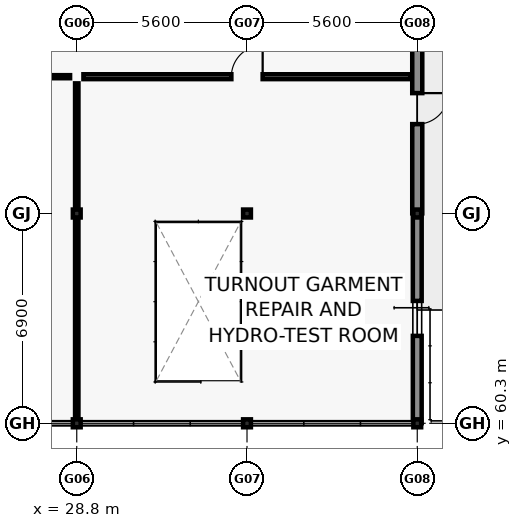
"""IFC4 building model, lengths in metres.
Left out: names, types, materials, properties, quantities, classifications, styles, units other than length and angle.
Written with IfcOpenShell. Run it as: python <this file> out.ifc"""

import sys

from ifc_helpers import new_model, si_unit, direction, frame, frame_2d, origin, origin_2d, place, context, subcontext, project, spatial, rectangle, i_section, extrude, element, fill, save


model = new_model("IFC4")
c1 = context("Model", 3, precision=1e-05, world=origin(), true_north=direction((0.0, 1.0)))
c2 = subcontext(c1, "Body", "Model", "MODEL_VIEW")
j1 = project(units=[si_unit("LENGTHUNIT", "METRE"), si_unit("PLANEANGLEUNIT", "RADIAN")], contexts=[c1])
p1 = place(None, origin())
s1 = spatial("IfcSite", under=j1, at=p1, CompositionType="ELEMENT")
p2 = place(p1, origin())
s2 = spatial("IfcBuilding", under=s1, at=p2, CompositionType="ELEMENT")
p3 = place(p2, frame((0.0, 0.0, 5.4)))
s3 = spatial("IfcBuildingStorey", under=s2, at=p3, CompositionType="ELEMENT", Elevation=5.4)
for number, where, z_axis, x_axis in (
    (1, (28.8, 60.3, 0.0), (0.0, 0.0, 1.0), (1.0, 0.0, 0.0)),
    (2, (28.8, 67.2, 0.0), (0.0, 0.0, 1.0), (1.0, 0.0, 0.0)),
    (3, (34.4, 60.3, 0.0), (0.0, 0.0, 1.0), (1.0, 0.0, 0.0)),
    (4, (34.4, 67.2, 0.0), (0.0, 0.0, 1.0), (1.0, 0.0, 0.0)),
    (5, (40.0, 60.3, 0.0), (0.0, 0.0, 1.0), (1.0, 0.0, 0.0)),
    (6, (40.0, 67.2, 0.0), (0.0, 0.0, 1.0), (1.0, 0.0, 0.0)),
):
    element("IfcColumn", number, at=place(p3, frame(where, z_axis=z_axis, x_axis=x_axis)), inside=s3, PredefinedType="COLUMN", context=c2, shape_type="SweptSolid", body=[
        extrude(i_section(OverallWidth=0.256, OverallDepth=0.26, WebThickness=0.01, FlangeThickness=0.017, FilletRadius=0.013, at=origin_2d()), origin(), (0.0, 0.0, 1.0), 4.2),
    ])
p4 = place(p3, frame((40.0, 67.195, 0.0), z_axis=(0.0, 0.0, 1.0), x_axis=(0.0, -1.0, 0.0)))
e7 = element("IfcWall", 7, at=p4, inside=s3, PredefinedType="SOLIDWALL", context=c2, shape_type="SweptSolid", body=[
    extrude(rectangle(XDim=6.89, YDim=0.29, at=frame_2d((3.445, 0.0))), origin(), (0.0, 0.0, 1.0), 3.32),
])
p5 = place(p4, frame((2.87, 0.0, 0.8)))
e8 = element("IfcOpeningElement", 8, at=p5, cuts=e7, PredefinedType="OPENING", context=c2, shape_type="SweptSolid", body=[
    extrude(rectangle(XDim=1.15, YDim=1.8, at=frame_2d((0.575, 0.9))), frame((0.0, 0.155, 0.0), z_axis=(0.0, -1.0, 0.0), x_axis=(1.0, 0.0, 0.0)), (0.0, 0.0, 1.0), 0.31),
])
p6 = place(p3, frame((40.0, 74.095, 0.0), z_axis=(0.0, 0.0, 1.0), x_axis=(0.0, -1.0, 0.0)))
e9 = element("IfcWall", 9, at=p6, inside=s3, PredefinedType="SOLIDWALL", context=c2, shape_type="SweptSolid", body=[
    extrude(rectangle(XDim=6.89, YDim=0.33, at=frame_2d((3.445, 0.0))), origin(), (0.0, 0.0, 1.0), 3.32),
])
p7 = place(p6, frame((2.935, 0.0, 0.0)))
e10 = element("IfcOpeningElement", 10, at=p7, cuts=e9, PredefinedType="OPENING", context=c2, shape_type="SweptSolid", body=[
    extrude(rectangle(XDim=1.02, YDim=2.14, at=frame_2d((0.51, 1.07))), frame((0.0, 0.175, 0.0), z_axis=(0.0, -1.0, 0.0), x_axis=(1.0, 0.0, 0.0)), (0.0, 0.0, 1.0), 0.35),
])
p8 = place(p3, frame((28.8, 60.52, 0.0), z_axis=(0.0, 0.0, 1.0), x_axis=(0.0, 1.0, 0.0)))
e11 = element("IfcWall", 11, at=p8, inside=s3, PredefinedType="PARTITIONING", context=c2, shape_type="SweptSolid", body=[
    extrude(rectangle(XDim=10.96, YDim=0.11, at=frame_2d((5.48, 0.0))), origin(), (0.0, 0.0, 1.0), 3.3),
])
p9 = place(p3, frame((17.82, 71.7, 0.0), z_axis=(0.0, 0.0, 1.0), x_axis=(1.0, 0.0, 0.0)))
e12 = element("IfcWall", 12, at=p9, inside=s3, PredefinedType="PARTITIONING", context=c2, shape_type="SweptSolid", body=[
    extrude(rectangle(XDim=10.76, YDim=0.1, at=frame_2d((5.38, 0.0))), origin(), (0.0, 0.0, 1.0), 3.3),
])
p10 = place(p9, frame((4.88, 0.0, 0.0)))
e13 = element("IfcOpeningElement", 13, at=p10, cuts=e12, PredefinedType="OPENING", context=c2, shape_type="SweptSolid", body=[
    extrude(rectangle(XDim=1.0, YDim=2.12, at=frame_2d((0.5, 1.06))), frame((0.0, 0.06, 0.0), z_axis=(0.0, -1.0, 0.0), x_axis=(1.0, 0.0, 0.0)), (0.0, 0.0, 1.0), 0.12),
])
p11 = place(p3, frame((29.02, 71.7, 0.0), z_axis=(0.0, 0.0, 1.0), x_axis=(1.0, 0.0, 0.0)))
e14 = element("IfcWall", 14, at=p11, inside=s3, PredefinedType="PARTITIONING", context=c2, shape_type="SweptSolid", body=[
    extrude(rectangle(XDim=10.76, YDim=0.16, at=frame_2d((5.38, 0.0))), origin(), (0.0, 0.0, 1.0), 3.3),
])
p12 = place(p11, frame((4.865, 0.0, 0.0)))
e15 = element("IfcOpeningElement", 15, at=p12, cuts=e14, PredefinedType="OPENING", context=c2, shape_type="SweptSolid", body=[
    extrude(rectangle(XDim=1.03, YDim=2.06, at=frame_2d((0.515, 1.03))), frame((0.0, 0.09, 0.0), z_axis=(0.0, -1.0, 0.0), x_axis=(1.0, 0.0, 0.0)), (0.0, 0.0, 1.0), 0.18),
])
p13 = place(p5, origin())
e16 = element("IfcWindow", 16, at=p13, inside=s3, PartitioningType="SINGLE_PANEL", PredefinedType="WINDOW", context=c2, shape_type="SweptSolid", body=[
    extrude(rectangle(XDim=1.15, YDim=1.8, at=frame_2d((0.575, 0.9))), frame((0.0, 0.03, 0.0), z_axis=(0.0, -1.0, 0.0), x_axis=(1.0, 0.0, 0.0)), (0.0, 0.0, 1.0), 0.06),
])
fill(e8, e16)
p14 = place(p7, origin())
e17 = element("IfcDoor", 17, at=p14, inside=s3, OperationType="SINGLE_SWING_LEFT", PredefinedType="DOOR", context=c2, shape_type="SweptSolid", body=[
    extrude(rectangle(XDim=1.02, YDim=2.14, at=frame_2d((0.51, 1.07))), frame((0.0, 0.025, 0.0), z_axis=(0.0, -1.0, 0.0), x_axis=(1.0, 0.0, 0.0)), (0.0, 0.0, 1.0), 0.05),
])
fill(e10, e17)
p15 = place(p12, origin())
e18 = element("IfcDoor", 18, at=p15, inside=s3, OperationType="SINGLE_SWING_RIGHT", PredefinedType="DOOR", context=c2, shape_type="SweptSolid", body=[
    extrude(rectangle(XDim=1.03, YDim=2.06, at=frame_2d((0.515, 1.03))), frame((0.0, 0.025, 0.0), z_axis=(0.0, -1.0, 0.0), x_axis=(1.0, 0.0, 0.0)), (0.0, 0.0, 1.0), 0.05),
])
fill(e15, e18)
save(model, sys.argv[1])
